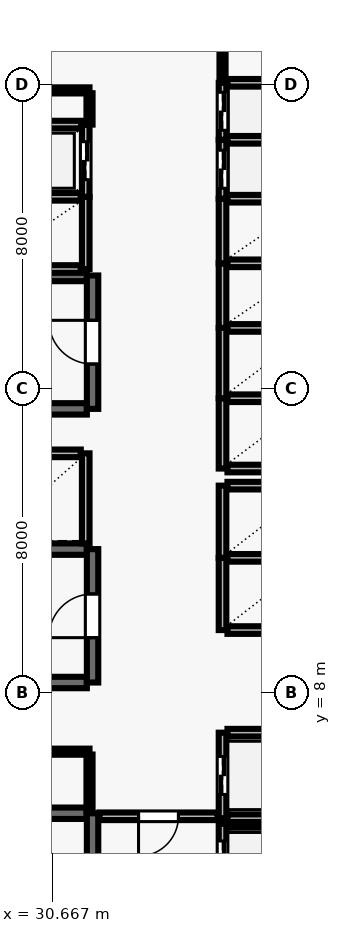
"""IFC4 building model, lengths in metres.
Left out: names, types, materials, properties, quantities, classifications, styles, units other than length and angle.
Written with IfcOpenShell. Run it as: python <this file> out.ifc"""

import sys

from ifc_helpers import new_model, si_unit, direction, frame, frame_2d, origin, place, context, subcontext, project, spatial, rectangle, extrude, element, fill, save


model = new_model("IFC4")
c1 = context("Model", 3, precision=1e-05, world=origin(), true_north=direction((0.0, 1.0)))
c2 = subcontext(c1, "Body", "Model", "MODEL_VIEW")
j1 = project(units=[si_unit("LENGTHUNIT", "METRE"), si_unit("PLANEANGLEUNIT", "RADIAN")], contexts=[c1])
p1 = place(None, origin())
s1 = spatial("IfcSite", under=j1, at=p1, CompositionType="ELEMENT")
p2 = place(p1, origin())
s2 = spatial("IfcBuilding", under=s1, at=p2, CompositionType="ELEMENT")
p3 = place(p2, frame((0.0, 0.0, 85.6)))
s3 = spatial("IfcBuildingStorey", under=s2, at=p3, CompositionType="ELEMENT", Elevation=85.6)
p4 = place(p3, frame((31.58, 4.83, 0.0), z_axis=(0.0, 0.0, 1.0), x_axis=(-1.0, 0.0, 0.0)))
e1 = element("IfcWall", 1, at=p4, inside=s3, PredefinedType="SHEAR", context=c2, shape_type="SweptSolid", body=[
    extrude(rectangle(XDim=8.36, YDim=0.3, at=frame_2d((4.18, 0.0))), origin(), (0.0, 0.0, 1.0), 3.69),
])
p5 = place(p3, frame((31.73, 0.96, 0.0), z_axis=(0.0, 0.0, 1.0), x_axis=(0.0, 1.0, 0.0)))
e2 = element("IfcWall", 2, at=p5, inside=s3, PredefinedType="SHEAR", context=c2, shape_type="SweptSolid", body=[
    extrude(rectangle(XDim=3.87, YDim=0.3, at=frame_2d((1.935, 0.0))), origin(), (0.0, 0.0, 1.0), 3.69),
])
p6 = place(p5, frame((1.54, 0.0, 0.0)))
e3 = element("IfcOpeningElement", 3, at=p6, cuts=e2, PredefinedType="OPENING", context=c2, shape_type="SweptSolid", body=[
    extrude(rectangle(XDim=1.15, YDim=2.15, at=frame_2d((0.575, 1.075))), frame((0.0, 0.16, 0.0), z_axis=(0.0, -1.0, 0.0), x_axis=(1.0, 0.0, 0.0)), (0.0, 0.0, 1.0), 0.32),
])
for number, where, z_axis, x_axis in (
    (4, (31.58, 18.98, 0.0), (0.0, 0.0, 1.0), (-1.0, 0.0, 0.0)),
    (5, (23.22, 15.47, 0.0), (0.0, 0.0, 1.0), (1.0, 0.0, 0.0)),
):
    element("IfcWall", number, at=place(p3, frame(where, z_axis=z_axis, x_axis=x_axis)), inside=s3, PredefinedType="SHEAR", context=c2, shape_type="SweptSolid", body=[
        extrude(rectangle(XDim=8.36, YDim=0.3, at=frame_2d((4.18, 0.0))), origin(), (0.0, 0.0, 1.0), 3.69),
    ])
p7 = place(p3, frame((31.73, 15.47, 0.0), z_axis=(0.0, 0.0, 1.0), x_axis=(0.0, 1.0, 0.0)))
e6 = element("IfcWall", 6, at=p7, inside=s3, PredefinedType="SHEAR", context=c2, shape_type="SweptSolid", body=[
    extrude(rectangle(XDim=3.51, YDim=0.3, at=frame_2d((1.755, 0.0))), origin(), (0.0, 0.0, 1.0), 3.69),
])
p8 = place(p7, frame((1.18, 0.0, 0.0)))
e7 = element("IfcOpeningElement", 7, at=p8, cuts=e6, PredefinedType="OPENING", context=c2, shape_type="SweptSolid", body=[
    extrude(rectangle(XDim=1.15, YDim=2.15, at=frame_2d((0.575, 1.075))), frame((0.0, 0.16, 0.0), z_axis=(0.0, -1.0, 0.0), x_axis=(1.0, 0.0, 0.0)), (0.0, 0.0, 1.0), 0.32),
])
for number, where, z_axis, x_axis in (
    (8, (31.58, 11.78, 0.0), (0.0, 0.0, 1.0), (-1.0, 0.0, 0.0)),
    (9, (23.22, 8.27, 0.0), (0.0, 0.0, 1.0), (1.0, 0.0, 0.0)),
):
    element("IfcWall", number, at=place(p3, frame(where, z_axis=z_axis, x_axis=x_axis)), inside=s3, PredefinedType="SHEAR", context=c2, shape_type="SweptSolid", body=[
        extrude(rectangle(XDim=8.36, YDim=0.3, at=frame_2d((4.18, 0.0))), origin(), (0.0, 0.0, 1.0), 3.69),
    ])
p9 = place(p3, frame((31.73, 8.27, 0.0), z_axis=(0.0, 0.0, 1.0), x_axis=(0.0, 1.0, 0.0)))
e10 = element("IfcWall", 10, at=p9, inside=s3, PredefinedType="SHEAR", context=c2, shape_type="SweptSolid", body=[
    extrude(rectangle(XDim=3.51, YDim=0.3, at=frame_2d((1.755, 0.0))), origin(), (0.0, 0.0, 1.0), 3.69),
])
p10 = place(p9, frame((1.18, 0.0, 0.0)))
e11 = element("IfcOpeningElement", 11, at=p10, cuts=e10, PredefinedType="OPENING", context=c2, shape_type="SweptSolid", body=[
    extrude(rectangle(XDim=1.15, YDim=2.15, at=frame_2d((0.575, 1.075))), frame((0.0, 0.16, 0.0), z_axis=(0.0, -1.0, 0.0), x_axis=(1.0, 0.0, 0.0)), (0.0, 0.0, 1.0), 0.32),
])
p11 = place(p3, frame((35.15, 4.55, 0.0), z_axis=(0.0, 0.0, 1.0), x_axis=(0.0, -1.0, 0.0)))
e12 = element("IfcWall", 12, at=p11, inside=s3, PredefinedType="SOLIDWALL", context=c2, shape_type="SweptSolid", body=[
    extrude(rectangle(XDim=2.1, YDim=0.2, at=frame_2d((1.05, 0.0))), origin(), (0.0, 0.0, 1.0), 3.69),
])
p12 = place(p11, frame((0.45, 0.0, 0.0)))
e13 = element("IfcOpeningElement", 13, at=p12, cuts=e12, PredefinedType="OPENING", context=c2, shape_type="SweptSolid", body=[
    extrude(rectangle(XDim=1.2, YDim=2.15, at=frame_2d((0.6, 1.075))), frame((0.0, 0.11, 0.0), z_axis=(0.0, -1.0, 0.0), x_axis=(1.0, 0.0, 0.0)), (0.0, 0.0, 1.0), 0.22),
])
p13 = place(p3, frame((37.42, 4.55, 0.0), z_axis=(0.0, 0.0, 1.0), x_axis=(-1.0, 0.0, 0.0)))
e14 = element("IfcWall", 14, at=p13, inside=s3, PredefinedType="SOLIDWALL", context=c2, shape_type="SweptSolid", body=[
    extrude(rectangle(XDim=2.14, YDim=0.2, at=frame_2d((1.07, 0.0))), origin(), (0.0, 0.0, 1.0), 3.69),
])
p14 = place(p3, frame((35.15, 6.95, 0.0), z_axis=(0.0, 0.0, 1.0), x_axis=(0.0, -1.0, 0.0)))
e15 = element("IfcWall", 15, at=p14, inside=s3, PredefinedType="SOLIDWALL", context=c2, shape_type="SweptSolid", body=[
    extrude(rectangle(XDim=2.25, YDim=0.2, at=frame_2d((1.125, 0.0))), origin(), (0.0, 0.0, 1.0), 3.69),
])
p15 = place(p14, frame((0.625, 0.0, 0.0)))
e16 = element("IfcOpeningElement", 16, at=p15, cuts=e15, PredefinedType="OPENING", context=c2, shape_type="SweptSolid", body=[
    extrude(rectangle(XDim=1.0, YDim=2.1, at=frame_2d((0.5, 1.05))), frame((0.0, 0.11, 0.0), z_axis=(0.0, -1.0, 0.0), x_axis=(1.0, 0.0, 0.0)), (0.0, 0.0, 1.0), 0.22),
])
for number, where, z_axis, x_axis in (
    (17, (35.28, 4.7, 0.0), (0.0, 0.0, 1.0), (1.0, 0.0, 0.0)),
    (18, (37.42, 6.95, 0.0), (0.0, 0.0, 1.0), (-1.0, 0.0, 0.0)),
):
    element("IfcWall", number, at=place(p3, frame(where, z_axis=z_axis, x_axis=x_axis)), inside=s3, PredefinedType="SOLIDWALL", context=c2, shape_type="SweptSolid", body=[
        extrude(rectangle(XDim=2.14, YDim=0.2, at=frame_2d((1.07, 0.0))), origin(), (0.0, 0.0, 1.0), 3.69),
    ])
p16 = place(p3, frame((35.15, 11.55, 0.0), z_axis=(0.0, 0.0, 1.0), x_axis=(0.0, -1.0, 0.0)))
e19 = element("IfcWall", 19, at=p16, inside=s3, PredefinedType="SOLIDWALL", context=c2, shape_type="SweptSolid", body=[
    extrude(rectangle(XDim=1.9, YDim=0.2, at=frame_2d((0.95, 0.0))), origin(), (0.0, 0.0, 1.0), 3.69),
])
for number, where, z_axis, x_axis in (
    (20, (35.28, 9.65, 0.0), (0.0, 0.0, 1.0), (1.0, 0.0, 0.0)),
    (21, (37.42, 11.55, 0.0), (0.0, 0.0, 1.0), (-1.0, 0.0, 0.0)),
):
    element("IfcWall", number, at=place(p3, frame(where, z_axis=z_axis, x_axis=x_axis)), inside=s3, PredefinedType="SOLIDWALL", context=c2, shape_type="SweptSolid", body=[
        extrude(rectangle(XDim=2.14, YDim=0.2, at=frame_2d((1.07, 0.0))), origin(), (0.0, 0.0, 1.0), 3.69),
    ])
p17 = place(p3, frame((35.15, 13.45, 0.0), z_axis=(0.0, 0.0, 1.0), x_axis=(0.0, -1.0, 0.0)))
e22 = element("IfcWall", 22, at=p17, inside=s3, PredefinedType="SOLIDWALL", context=c2, shape_type="SweptSolid", body=[
    extrude(rectangle(XDim=1.9, YDim=0.2, at=frame_2d((0.95, 0.0))), origin(), (0.0, 0.0, 1.0), 3.69),
])
p18 = place(p3, frame((37.42, 13.45, 0.0), z_axis=(0.0, 0.0, 1.0), x_axis=(-1.0, 0.0, 0.0)))
e23 = element("IfcWall", 23, at=p18, inside=s3, PredefinedType="SOLIDWALL", context=c2, shape_type="SweptSolid", body=[
    extrude(rectangle(XDim=2.14, YDim=0.2, at=frame_2d((1.07, 0.0))), origin(), (0.0, 0.0, 1.0), 3.69),
])
p19 = place(p3, frame((31.55, 11.93, 0.0), z_axis=(0.0, 0.0, 1.0), x_axis=(0.0, 1.0, 0.0)))
e24 = element("IfcWall", 24, at=p19, inside=s3, PredefinedType="SOLIDWALL", context=c2, shape_type="SweptSolid", body=[
    extrude(rectangle(XDim=2.37, YDim=0.2, at=frame_2d((1.185, 0.0))), origin(), (0.0, 0.0, 1.0), 3.69),
])
p20 = place(p3, frame((31.42, 14.3, 0.0), z_axis=(0.0, 0.0, 1.0), x_axis=(-1.0, 0.0, 0.0)))
e25 = element("IfcWall", 25, at=p20, inside=s3, PredefinedType="SOLIDWALL", context=c2, shape_type="SweptSolid", body=[
    extrude(rectangle(XDim=2.44, YDim=0.2, at=frame_2d((1.22, 0.0))), origin(), (0.0, 0.0, 1.0), 3.69),
])
p21 = place(p3, frame((35.15, 15.75, 0.0), z_axis=(0.0, 0.0, 1.0), x_axis=(0.0, -1.0, 0.0)))
e26 = element("IfcWall", 26, at=p21, inside=s3, PredefinedType="SOLIDWALL", context=c2, shape_type="SweptSolid", body=[
    extrude(rectangle(XDim=1.85, YDim=0.2, at=frame_2d((0.925, 0.0))), origin(), (0.0, 0.0, 1.0), 3.69),
])
for number, where, z_axis, x_axis in (
    (27, (35.28, 13.9, 0.0), (0.0, 0.0, 1.0), (1.0, 0.0, 0.0)),
    (28, (37.42, 15.75, 0.0), (0.0, 0.0, 1.0), (-1.0, 0.0, 0.0)),
):
    element("IfcWall", number, at=place(p3, frame(where, z_axis=z_axis, x_axis=x_axis)), inside=s3, PredefinedType="SOLIDWALL", context=c2, shape_type="SweptSolid", body=[
        extrude(rectangle(XDim=2.14, YDim=0.2, at=frame_2d((1.07, 0.0))), origin(), (0.0, 0.0, 1.0), 3.69),
    ])
p22 = place(p3, frame((35.15, 17.6, 0.0), z_axis=(0.0, 0.0, 1.0), x_axis=(0.0, -1.0, 0.0)))
e29 = element("IfcWall", 29, at=p22, inside=s3, PredefinedType="SOLIDWALL", context=c2, shape_type="SweptSolid", body=[
    extrude(rectangle(XDim=1.85, YDim=0.2, at=frame_2d((0.925, 0.0))), origin(), (0.0, 0.0, 1.0), 3.69),
])
p23 = place(p3, frame((37.42, 17.6, 0.0), z_axis=(0.0, 0.0, 1.0), x_axis=(-1.0, 0.0, 0.0)))
e30 = element("IfcWall", 30, at=p23, inside=s3, PredefinedType="SOLIDWALL", context=c2, shape_type="SweptSolid", body=[
    extrude(rectangle(XDim=2.14, YDim=0.2, at=frame_2d((1.07, 0.0))), origin(), (0.0, 0.0, 1.0), 3.69),
])
p24 = place(p3, frame((35.15, 19.3, 0.0), z_axis=(0.0, 0.0, 1.0), x_axis=(0.0, -1.0, 0.0)))
e31 = element("IfcWall", 31, at=p24, inside=s3, PredefinedType="SOLIDWALL", context=c2, shape_type="SweptSolid", body=[
    extrude(rectangle(XDim=1.7, YDim=0.2, at=frame_2d((0.85, 0.0))), origin(), (0.0, 0.0, 1.0), 3.69),
])
p25 = place(p3, frame((37.42, 19.3, 0.0), z_axis=(0.0, 0.0, 1.0), x_axis=(-1.0, 0.0, 0.0)))
e32 = element("IfcWall", 32, at=p25, inside=s3, PredefinedType="SOLIDWALL", context=c2, shape_type="SweptSolid", body=[
    extrude(rectangle(XDim=2.14, YDim=0.2, at=frame_2d((1.07, 0.0))), origin(), (0.0, 0.0, 1.0), 3.69),
])
p26 = place(p3, frame((35.15, 21.0, 0.0), z_axis=(0.0, 0.0, 1.0), x_axis=(0.0, -1.0, 0.0)))
e33 = element("IfcWall", 33, at=p26, inside=s3, PredefinedType="SOLIDWALL", context=c2, shape_type="SweptSolid", body=[
    extrude(rectangle(XDim=1.7, YDim=0.2, at=frame_2d((0.85, 0.0))), origin(), (0.0, 0.0, 1.0), 3.69),
])
p27 = place(p3, frame((37.42, 21.0, 0.0), z_axis=(0.0, 0.0, 1.0), x_axis=(-1.0, 0.0, 0.0)))
e34 = element("IfcWall", 34, at=p27, inside=s3, PredefinedType="SOLIDWALL", context=c2, shape_type="SweptSolid", body=[
    extrude(rectangle(XDim=2.14, YDim=0.2, at=frame_2d((1.07, 0.0))), origin(), (0.0, 0.0, 1.0), 3.69),
])
p28 = place(p3, frame((31.55, 19.15, 0.0), z_axis=(0.0, 0.0, 1.0), x_axis=(0.0, 1.0, 0.0)))
e35 = element("IfcWall", 35, at=p28, inside=s3, PredefinedType="SOLIDWALL", context=c2, shape_type="SweptSolid", body=[
    extrude(rectangle(XDim=1.9, YDim=0.2, at=frame_2d((0.95, 0.0))), origin(), (0.0, 0.0, 1.0), 3.69),
])
for number, where, z_axis, x_axis in (
    (36, (28.98, 19.15, 0.0), (0.0, 0.0, 1.0), (1.0, 0.0, 0.0)),
    (37, (31.42, 21.05, 0.0), (0.0, 0.0, 1.0), (-1.0, 0.0, 0.0)),
):
    element("IfcWall", number, at=place(p3, frame(where, z_axis=z_axis, x_axis=x_axis)), inside=s3, PredefinedType="SOLIDWALL", context=c2, shape_type="SweptSolid", body=[
        extrude(rectangle(XDim=2.44, YDim=0.2, at=frame_2d((1.22, 0.0))), origin(), (0.0, 0.0, 1.0), 3.69),
    ])
p29 = place(p3, frame((35.15, 22.55, 0.0), z_axis=(0.0, 0.0, 1.0), x_axis=(0.0, -1.0, 0.0)))
e38 = element("IfcWall", 38, at=p29, inside=s3, PredefinedType="SOLIDWALL", context=c2, shape_type="SweptSolid", body=[
    extrude(rectangle(XDim=1.55, YDim=0.2, at=frame_2d((0.775, 0.0))), origin(), (0.0, 0.0, 1.0), 3.69),
])
p30 = place(p29, frame((0.275, 0.0, 0.0)))
e39 = element("IfcOpeningElement", 39, at=p30, cuts=e38, PredefinedType="OPENING", context=c2, shape_type="SweptSolid", body=[
    extrude(rectangle(XDim=1.0, YDim=2.1, at=frame_2d((0.5, 1.05))), frame((0.0, 0.11, 0.0), z_axis=(0.0, -1.0, 0.0), x_axis=(1.0, 0.0, 0.0)), (0.0, 0.0, 1.0), 0.22),
])
p31 = place(p3, frame((37.42, 22.55, 0.0), z_axis=(0.0, 0.0, 1.0), x_axis=(-1.0, 0.0, 0.0)))
e40 = element("IfcWall", 40, at=p31, inside=s3, PredefinedType="SOLIDWALL", context=c2, shape_type="SweptSolid", body=[
    extrude(rectangle(XDim=2.14, YDim=0.2, at=frame_2d((1.07, 0.0))), origin(), (0.0, 0.0, 1.0), 3.69),
])
p32 = place(p3, frame((35.15, 24.05, 0.0), z_axis=(0.0, 0.0, 1.0), x_axis=(0.0, -1.0, 0.0)))
e41 = element("IfcWall", 41, at=p32, inside=s3, PredefinedType="SOLIDWALL", context=c2, shape_type="SweptSolid", body=[
    extrude(rectangle(XDim=1.5, YDim=0.2, at=frame_2d((0.75, 0.0))), origin(), (0.0, 0.0, 1.0), 3.69),
])
p33 = place(p32, frame((0.25, 0.0, 0.0)))
e42 = element("IfcOpeningElement", 42, at=p33, cuts=e41, PredefinedType="OPENING", context=c2, shape_type="SweptSolid", body=[
    extrude(rectangle(XDim=1.0, YDim=2.1, at=frame_2d((0.5, 1.05))), frame((0.0, 0.11, 0.0), z_axis=(0.0, -1.0, 0.0), x_axis=(1.0, 0.0, 0.0)), (0.0, 0.0, 1.0), 0.22),
])
p34 = place(p3, frame((37.42, 24.05, 0.0), z_axis=(0.0, 0.0, 1.0), x_axis=(-1.0, 0.0, 0.0)))
e43 = element("IfcWall", 43, at=p34, inside=s3, PredefinedType="SOLIDWALL", context=c2, shape_type="SweptSolid", body=[
    extrude(rectangle(XDim=2.14, YDim=0.2, at=frame_2d((1.07, 0.0))), origin(), (0.0, 0.0, 1.0), 3.69),
])
p35 = place(p3, frame((31.55, 21.05, 0.0), z_axis=(0.0, 0.0, 1.0), x_axis=(0.0, 1.0, 0.0)))
e44 = element("IfcWall", 44, at=p35, inside=s3, PredefinedType="SOLIDWALL", context=c2, shape_type="SweptSolid", body=[
    extrude(rectangle(XDim=1.9, YDim=0.2, at=frame_2d((0.95, 0.0))), origin(), (0.0, 0.0, 1.0), 3.69),
])
p36 = place(p35, frame((0.45, 0.0, 0.0)))
e45 = element("IfcOpeningElement", 45, at=p36, cuts=e44, PredefinedType="OPENING", context=c2, shape_type="SweptSolid", body=[
    extrude(rectangle(XDim=1.0, YDim=2.1, at=frame_2d((0.5, 1.05))), frame((0.0, 0.11, 0.0), z_axis=(0.0, -1.0, 0.0), x_axis=(1.0, 0.0, 0.0)), (0.0, 0.0, 1.0), 0.22),
])
p37 = place(p3, frame((31.43, 22.95, 0.0), z_axis=(0.0, 0.0, 1.0), x_axis=(-1.0, 0.0, 0.0)))
e46 = element("IfcWall", 46, at=p37, inside=s3, PredefinedType="SOLIDWALL", context=c2, shape_type="SweptSolid", body=[
    extrude(rectangle(XDim=2.46, YDim=0.2, at=frame_2d((1.23, 0.0))), origin(), (0.0, 0.0, 1.0), 3.69),
])
p38 = place(p3, frame((28.55, 6.45, 0.0), z_axis=(0.0, 0.0, 1.0), x_axis=(1.0, 0.0, 0.0)))
e47 = element("IfcWall", 47, at=p38, inside=s3, PredefinedType="PARTITIONING", context=c2, shape_type="SweptSolid", body=[
    extrude(rectangle(XDim=3.1, YDim=0.16, at=frame_2d((1.55, 0.0))), origin(), (0.0, 0.0, 1.0), 3.69),
])
p39 = place(p38, frame((1.11, 0.0, 0.0)))
e48 = element("IfcOpeningElement", 48, at=p39, cuts=e47, PredefinedType="OPENING", context=c2, shape_type="SweptSolid", body=[
    extrude(rectangle(XDim=0.88, YDim=2.1, at=frame_2d((0.44, 1.05))), frame((0.0, 0.09, 0.0), z_axis=(0.0, -1.0, 0.0), x_axis=(1.0, 0.0, 0.0)), (0.0, 0.0, 1.0), 0.18),
])
p40 = place(p3, frame((28.8, 23.85, 0.0), z_axis=(0.0, 0.0, 1.0), x_axis=(1.0, 0.0, 0.0)))
e49 = element("IfcWall", 49, at=p40, inside=s3, PredefinedType="PARTITIONING", context=c2, shape_type="SweptSolid", body=[
    extrude(rectangle(XDim=2.85, YDim=0.16, at=frame_2d((1.425, 0.0))), origin(), (0.0, 0.0, 1.0), 3.69),
])
p41 = place(p3, frame((35.02, 4.75, 0.0), z_axis=(0.0, 0.0, 1.0), x_axis=(-1.0, 0.0, 0.0)))
e50 = element("IfcWall", 50, at=p41, inside=s3, PredefinedType="SOLIDWALL", context=c2, shape_type="SweptSolid", body=[
    extrude(rectangle(XDim=3.11, YDim=0.2, at=frame_2d((1.555, 0.0))), origin(), (0.0, 0.0, 1.0), 3.69),
])
p42 = place(p41, frame((1.03, 0.0, 0.0)))
e51 = element("IfcOpeningElement", 51, at=p42, cuts=e50, PredefinedType="OPENING", context=c2, shape_type="SweptSolid", body=[
    extrude(rectangle(XDim=1.05, YDim=2.15, at=frame_2d((0.525, 1.075))), frame((0.0, 0.11, 0.0), z_axis=(0.0, -1.0, 0.0), x_axis=(1.0, 0.0, 0.0)), (0.0, 0.0, 1.0), 0.22),
])
p43 = place(p3, frame((31.65, 4.86, 0.0), z_axis=(0.0, 0.0, 1.0), x_axis=(0.0, 1.0, 0.0)))
e52 = element("IfcWall", 52, at=p43, inside=s3, PredefinedType="PARTITIONING", context=c2, shape_type="SweptSolid", body=[
    extrude(rectangle(XDim=1.515, YDim=0.16, at=frame_2d((0.757, 0.0))), origin(), (0.0, 0.0, 1.0), 3.69),
])
p44 = place(p3, frame((31.65, 23.775, 0.0), z_axis=(0.0, 0.0, 1.0), x_axis=(0.0, -1.0, 0.0)))
e53 = element("IfcWall", 53, at=p44, inside=s3, PredefinedType="PARTITIONING", context=c2, shape_type="SweptSolid", body=[
    extrude(rectangle(XDim=0.825, YDim=0.16, at=frame_2d((0.413, 0.0))), origin(), (0.0, 0.0, 1.0), 3.69),
])
p45 = place(p3, frame((35.15, 24.07, 0.0), z_axis=(0.0, 0.0, 1.0), x_axis=(0.0, 1.0, 0.0)))
e54 = element("IfcWall", 54, at=p45, inside=s3, PredefinedType="PARTITIONING", context=c2, shape_type="SweptSolid", body=[
    extrude(rectangle(XDim=1.855, YDim=0.16, at=frame_2d((0.927, 0.0))), origin(), (0.0, 0.0, 1.0), 3.69),
])
p46 = place(p8, origin())
e55 = element("IfcDoor", 55, at=p46, inside=s3, OperationType="SINGLE_SWING_RIGHT", PredefinedType="DOOR", context=c2, shape_type="SweptSolid", body=[
    extrude(rectangle(XDim=1.15, YDim=2.15, at=frame_2d((0.575, 1.075))), frame((0.0, 0.025, 0.0), z_axis=(0.0, -1.0, 0.0), x_axis=(1.0, 0.0, 0.0)), (0.0, 0.0, 1.0), 0.05),
])
fill(e7, e55)
p47 = place(p10, origin())
e56 = element("IfcDoor", 56, at=p47, inside=s3, OperationType="SINGLE_SWING_LEFT", PredefinedType="DOOR", context=c2, shape_type="SweptSolid", body=[
    extrude(rectangle(XDim=1.15, YDim=2.15, at=frame_2d((0.575, 1.075))), frame((0.0, 0.025, 0.0), z_axis=(0.0, -1.0, 0.0), x_axis=(1.0, 0.0, 0.0)), (0.0, 0.0, 1.0), 0.05),
])
fill(e11, e56)
p48 = place(p12, origin())
e57 = element("IfcDoor", 57, at=p48, inside=s3, OperationType="DOUBLE_DOOR_SLIDING", PredefinedType="DOOR", context=c2, shape_type="SweptSolid", body=[
    extrude(rectangle(XDim=1.2, YDim=2.15, at=frame_2d((0.6, 1.075))), frame((0.0, 0.025, 0.0), z_axis=(0.0, -1.0, 0.0), x_axis=(1.0, 0.0, 0.0)), (0.0, 0.0, 1.0), 0.05),
])
fill(e13, e57)
p49 = place(p15, origin())
e58 = element("IfcDoor", 58, at=p49, inside=s3, OperationType="DOUBLE_DOOR_SLIDING", PredefinedType="DOOR", context=c2, shape_type="SweptSolid", body=[
    extrude(rectangle(XDim=1.0, YDim=2.1, at=frame_2d((0.5, 1.05))), frame((0.0, 0.025, 0.0), z_axis=(0.0, -1.0, 0.0), x_axis=(1.0, 0.0, 0.0)), (0.0, 0.0, 1.0), 0.05),
])
fill(e16, e58)
p50 = place(p30, origin())
e59 = element("IfcDoor", 59, at=p50, inside=s3, OperationType="DOUBLE_DOOR_SLIDING", PredefinedType="DOOR", context=c2, shape_type="SweptSolid", body=[
    extrude(rectangle(XDim=1.0, YDim=2.1, at=frame_2d((0.5, 1.05))), frame((0.0, 0.025, 0.0), z_axis=(0.0, -1.0, 0.0), x_axis=(1.0, 0.0, 0.0)), (0.0, 0.0, 1.0), 0.05),
])
fill(e39, e59)
p51 = place(p33, origin())
e60 = element("IfcDoor", 60, at=p51, inside=s3, OperationType="DOUBLE_DOOR_SLIDING", PredefinedType="DOOR", context=c2, shape_type="SweptSolid", body=[
    extrude(rectangle(XDim=1.0, YDim=2.1, at=frame_2d((0.5, 1.05))), frame((0.0, 0.025, 0.0), z_axis=(0.0, -1.0, 0.0), x_axis=(1.0, 0.0, 0.0)), (0.0, 0.0, 1.0), 0.05),
])
fill(e42, e60)
p52 = place(p36, origin())
e61 = element("IfcDoor", 61, at=p52, inside=s3, OperationType="DOUBLE_DOOR_SLIDING", PredefinedType="DOOR", context=c2, shape_type="SweptSolid", body=[
    extrude(rectangle(XDim=1.0, YDim=2.1, at=frame_2d((0.5, 1.05))), frame((0.0, 0.025, 0.0), z_axis=(0.0, -1.0, 0.0), x_axis=(1.0, 0.0, 0.0)), (0.0, 0.0, 1.0), 0.05),
])
fill(e45, e61)
p53 = place(p42, origin())
e62 = element("IfcDoor", 62, at=p53, inside=s3, OperationType="SINGLE_SWING_RIGHT", PredefinedType="DOOR", context=c2, shape_type="SweptSolid", body=[
    extrude(rectangle(XDim=1.05, YDim=2.15, at=frame_2d((0.525, 1.075))), frame((0.0, 0.025, 0.0), z_axis=(0.0, -1.0, 0.0), x_axis=(1.0, 0.0, 0.0)), (0.0, 0.0, 1.0), 0.05),
])
fill(e51, e62)
save(model, sys.argv[1])
